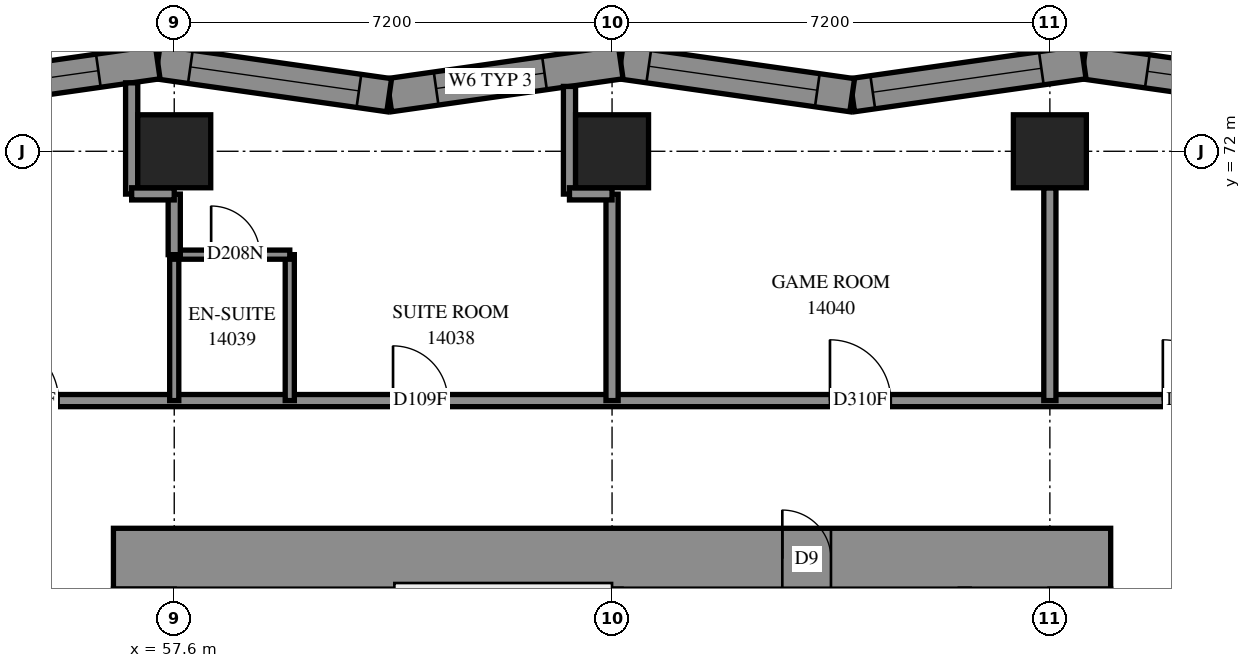
"""IFC4 building model, lengths in metres.
Left out: names, types, materials, properties, quantities, classifications, styles, units other than length and angle.
Written with IfcOpenShell. Run it as: python <this file> out.ifc"""

import sys

from ifc_helpers import new_model, si_unit, direction, frame, frame_2d, origin, origin_2d, place, context, subcontext, project, spatial, polyline, rectangle, outline, extrude, element, fill, save


model = new_model("IFC4")
c1 = context("Model", 3, precision=1e-05, world=origin(), true_north=direction((0.0, 1.0)))
c2 = subcontext(c1, "Body", "Model", "MODEL_VIEW")
j1 = project(units=[si_unit("LENGTHUNIT", "METRE"), si_unit("PLANEANGLEUNIT", "RADIAN")], contexts=[c1])
p1 = place(None, origin())
s1 = spatial("IfcSite", under=j1, at=p1, CompositionType="ELEMENT")
p2 = place(p1, origin())
s2 = spatial("IfcBuilding", under=s1, at=p2, CompositionType="ELEMENT")
p3 = place(p2, frame((0.0, 0.0, 54.2)))
s3 = spatial("IfcBuildingStorey", under=s2, at=p3, CompositionType="ELEMENT", Elevation=54.2)
for number, where, z_axis, x_axis in (
    (1, (57.6, 72.0, 0.0), (0.0, 0.0, 1.0), (1.0, 0.0, 0.0)),
    (2, (64.8, 72.0, 0.0), (0.0, 0.0, 1.0), (1.0, 0.0, 0.0)),
    (3, (72.0, 72.0, 0.0), (0.0, 0.0, 1.0), (1.0, 0.0, 0.0)),
):
    element("IfcColumn", number, at=place(p3, frame(where, z_axis=z_axis, x_axis=x_axis)), inside=s3, PredefinedType="COLUMN", context=c2, shape_type="SweptSolid", body=[
        extrude(rectangle(XDim=1.2, YDim=1.2, at=origin_2d()), origin(), (0.0, 0.0, 1.0), 3.1),
    ])
p4 = place(p3, frame((56.6, 65.3, -0.3), z_axis=(0.0, 0.0, 1.0), x_axis=(1.0, 0.0, 0.0)))
e4 = element("IfcWall", 4, at=p4, inside=s3, PredefinedType="SHEAR", context=c2, shape_type="SweptSolid", body=[
    extrude(rectangle(XDim=16.4, YDim=1.0, at=frame_2d((8.2, 0.0))), origin(), (0.0, 0.0, 1.0), 2.7),
])
p5 = place(p4, frame((11.0, 0.0, 0.3)))
e5 = element("IfcOpeningElement", 5, at=p5, cuts=e4, PredefinedType="OPENING", context=c2, shape_type="SweptSolid", body=[
    extrude(rectangle(XDim=0.8, YDim=2.1, at=frame_2d((0.4, 1.05))), frame((0.0, 0.51, 0.0), z_axis=(0.0, -1.0, 0.0), x_axis=(1.0, 0.0, 0.0)), (0.0, 0.0, 1.0), 1.02),
])
p6 = place(p3, frame((76.384, 72.919, 0.0), z_axis=(0.0, 0.0, 1.0), x_axis=(-0.9900171381, 0.1409470338, 0.0)))
e6 = element("IfcWall", 6, at=p6, inside=s3, PredefinedType="SOLIDWALL", context=c2, shape_type="SweptSolid", body=[
    extrude(outline(polyline([(0.06, -0.275), (3.906, -0.275), (3.828, 0.275), (-0.06, 0.275), (0.06, -0.275)])), origin(), (0.0, 0.0, 1.0), 3.1),
])
p7 = place(p6, frame((1.61, 0.0, 0.5)))
e7 = element("IfcOpeningElement", 7, at=p7, cuts=e6, PredefinedType="OPENING", context=c2, shape_type="SweptSolid", body=[
    extrude(rectangle(XDim=1.2, YDim=2.45, at=frame_2d((0.6, 1.225))), frame((0.0, 0.285, 0.0), z_axis=(0.0, -1.0, 0.0), x_axis=(1.0, 0.0, 0.0)), (0.0, 0.0, 1.0), 0.57),
])
p8 = place(p3, frame((72.556, 73.464, 0.0), z_axis=(0.0, 0.0, 1.0), x_axis=(-0.990016994, -0.1409480459, 0.0)))
e8 = element("IfcWall", 8, at=p8, inside=s3, PredefinedType="SOLIDWALL", context=c2, shape_type="SweptSolid", body=[
    extrude(outline(polyline([(-0.039, -0.275), (3.806, -0.275), (3.885, 0.275), (0.039, 0.275), (-0.039, -0.275)])), origin(), (0.0, 0.0, 1.0), 3.1),
])
p9 = place(p8, frame((0.704, 0.0, 0.5)))
e9 = element("IfcOpeningElement", 9, at=p9, cuts=e8, PredefinedType="OPENING", context=c2, shape_type="SweptSolid", body=[
    extrude(rectangle(XDim=2.8, YDim=2.45, at=frame_2d((1.4, 1.225))), frame((0.0, 0.285, 0.0), z_axis=(0.0, -1.0, 0.0), x_axis=(1.0, 0.0, 0.0)), (0.0, 0.0, 1.0), 0.57),
])
p10 = place(p3, frame((68.749, 72.922, 0.0), z_axis=(0.0, 0.0, 1.0), x_axis=(-0.990016994, 0.1409480459, 0.0)))
e10 = element("IfcWall", 10, at=p10, inside=s3, PredefinedType="SOLIDWALL", context=c2, shape_type="SweptSolid", body=[
    extrude(outline(polyline([(0.039, -0.275), (3.885, -0.275), (3.806, 0.275), (-0.039, 0.275), (0.039, -0.275)])), origin(), (0.0, 0.0, 1.0), 3.1),
])
p11 = place(p10, frame((0.579, 0.0, 0.5)))
e11 = element("IfcOpeningElement", 11, at=p11, cuts=e10, PredefinedType="OPENING", context=c2, shape_type="SweptSolid", body=[
    extrude(rectangle(XDim=2.8, YDim=2.45, at=frame_2d((1.4, 1.225))), frame((0.0, 0.285, 0.0), z_axis=(0.0, -1.0, 0.0), x_axis=(1.0, 0.0, 0.0)), (0.0, 0.0, 1.0), 0.57),
])
p12 = place(p3, frame((64.942, 73.464, 0.0), z_axis=(0.0, 0.0, 1.0), x_axis=(-0.990016994, -0.1409480459, 0.0)))
e12 = element("IfcWall", 12, at=p12, inside=s3, PredefinedType="SOLIDWALL", context=c2, shape_type="SweptSolid", body=[
    extrude(outline(polyline([(-0.039, -0.275), (3.806, -0.275), (3.885, 0.275), (0.039, 0.275), (-0.039, -0.275)])), origin(), (0.0, 0.0, 1.0), 3.1),
])
p13 = place(p12, frame((1.266, 0.0, 0.7)))
e13 = element("IfcOpeningElement", 13, at=p13, cuts=e12, PredefinedType="OPENING", context=c2, shape_type="SweptSolid", body=[
    extrude(rectangle(XDim=1.8, YDim=2.2, at=frame_2d((0.9, 1.1))), frame((0.0, 0.285, 0.0), z_axis=(0.0, -1.0, 0.0), x_axis=(1.0, 0.0, 0.0)), (0.0, 0.0, 1.0), 0.57),
])
p14 = place(p3, frame((61.135, 72.922, 0.0), z_axis=(0.0, 0.0, 1.0), x_axis=(-0.990016994, 0.1409480459, 0.0)))
e14 = element("IfcWall", 14, at=p14, inside=s3, PredefinedType="SOLIDWALL", context=c2, shape_type="SweptSolid", body=[
    extrude(outline(polyline([(0.039, -0.275), (3.885, -0.275), (3.806, 0.275), (-0.039, 0.275), (0.039, -0.275)])), origin(), (0.0, 0.0, 1.0), 3.1),
])
p15 = place(p14, frame((0.503, 0.0, 0.5)))
e15 = element("IfcOpeningElement", 15, at=p15, cuts=e14, PredefinedType="OPENING", context=c2, shape_type="SweptSolid", body=[
    extrude(rectangle(XDim=2.8, YDim=2.45, at=frame_2d((1.4, 1.225))), frame((0.0, 0.285, 0.0), z_axis=(0.0, -1.0, 0.0), x_axis=(1.0, 0.0, 0.0)), (0.0, 0.0, 1.0), 0.57),
])
p16 = place(p3, frame((57.328, 73.464, 0.0), z_axis=(0.0, 0.0, 1.0), x_axis=(-0.990016994, -0.1409480459, 0.0)))
e16 = element("IfcWall", 16, at=p16, inside=s3, PredefinedType="SOLIDWALL", context=c2, shape_type="SweptSolid", body=[
    extrude(outline(polyline([(-0.039, -0.275), (3.806, -0.275), (3.885, 0.275), (0.039, 0.275), (-0.039, -0.275)])), origin(), (0.0, 0.0, 1.0), 3.1),
])
p17 = place(p16, frame((0.986, 0.0, 0.7)))
e17 = element("IfcOpeningElement", 17, at=p17, cuts=e16, PredefinedType="OPENING", context=c2, shape_type="SweptSolid", body=[
    extrude(rectangle(XDim=1.8, YDim=2.2, at=frame_2d((0.9, 1.1))), frame((0.0, 0.285, 0.0), z_axis=(0.0, -1.0, 0.0), x_axis=(1.0, 0.0, 0.0)), (0.0, 0.0, 1.0), 0.57),
])
p18 = place(p3, frame((54.5, 67.9, 0.0), z_axis=(0.0, 0.0, 1.0), x_axis=(1.0, 0.0, 0.0)))
e18 = element("IfcWall", 18, at=p18, inside=s3, PredefinedType="PARTITIONING", context=c2, shape_type="SweptSolid", body=[
    extrude(rectangle(XDim=20.6, YDim=0.2, at=frame_2d((10.3, 0.0))), origin(), (0.0, 0.0, 1.0), 3.1),
])
p19 = place(p18, frame((0.198, 0.0, 0.0)))
e19 = element("IfcOpeningElement", 19, at=p19, cuts=e18, PredefinedType="OPENING", context=c2, shape_type="SweptSolid", body=[
    extrude(rectangle(XDim=1.0, YDim=2.1, at=frame_2d((0.5, 1.05))), frame((0.0, 0.11, 0.0), z_axis=(0.0, -1.0, 0.0), x_axis=(1.0, 0.0, 0.0)), (0.0, 0.0, 1.0), 0.22),
])
p20 = place(p18, frame((19.358, 0.0, 0.0)))
e20 = element("IfcOpeningElement", 20, at=p20, cuts=e18, PredefinedType="OPENING", context=c2, shape_type="SweptSolid", body=[
    extrude(rectangle(XDim=1.0, YDim=2.1, at=frame_2d((0.5, 1.05))), frame((0.0, 0.11, 0.0), z_axis=(0.0, -1.0, 0.0), x_axis=(1.0, 0.0, 0.0)), (0.0, 0.0, 1.0), 0.22),
])
p21 = place(p18, frame((6.698, 0.0, 0.0)))
e21 = element("IfcOpeningElement", 21, at=p21, cuts=e18, PredefinedType="OPENING", context=c2, shape_type="SweptSolid", body=[
    extrude(rectangle(XDim=0.9, YDim=2.1, at=frame_2d((0.45, 1.05))), frame((0.0, 0.11, 0.0), z_axis=(0.0, -1.0, 0.0), x_axis=(1.0, 0.0, 0.0)), (0.0, 0.0, 1.0), 0.22),
])
p22 = place(p18, frame((13.884, 0.0, 0.0)))
e22 = element("IfcOpeningElement", 22, at=p22, cuts=e18, PredefinedType="OPENING", context=c2, shape_type="SweptSolid", body=[
    extrude(rectangle(XDim=1.0, YDim=2.1, at=frame_2d((0.5, 1.05))), frame((0.0, 0.11, 0.0), z_axis=(0.0, -1.0, 0.0), x_axis=(1.0, 0.0, 0.0)), (0.0, 0.0, 1.0), 0.22),
])
p23 = place(p3, frame((72.0, 67.9, 0.0), z_axis=(0.0, 0.0, 1.0), x_axis=(0.0, 1.0, 0.0)))
e23 = element("IfcWall", 23, at=p23, inside=s3, PredefinedType="PARTITIONING", context=c2, shape_type="SweptSolid", body=[
    extrude(rectangle(XDim=3.5, YDim=0.2, at=frame_2d((1.75, 0.0))), origin(), (0.0, 0.0, 1.0), 3.1),
])
p24 = place(p3, frame((64.8, 67.9, 0.0), z_axis=(0.0, 0.0, 1.0), x_axis=(0.0, 1.0, 0.0)))
e24 = element("IfcWall", 24, at=p24, inside=s3, PredefinedType="PARTITIONING", context=c2, shape_type="SweptSolid", body=[
    extrude(rectangle(XDim=3.396, YDim=0.2, at=frame_2d((1.698, 0.0))), origin(), (0.0, 0.0, 1.0), 3.1),
])
for number, where, z_axis, x_axis in (
    (25, (59.5, 67.9, 0.0), (0.0, 0.0, 1.0), (0.0, 1.0, 0.0)),
    (26, (57.6, 67.9, 0.0), (0.0, 0.0, 1.0), (0.0, 1.0, 0.0)),
):
    element("IfcWall", number, at=place(p3, frame(where, z_axis=z_axis, x_axis=x_axis)), inside=s3, PredefinedType="PARTITIONING", context=c2, shape_type="SweptSolid", body=[
        extrude(rectangle(XDim=2.4, YDim=0.15, at=frame_2d((1.2, 0.0))), origin(), (0.0, 0.0, 1.0), 3.1),
    ])
p25 = place(p3, frame((57.6, 70.3, 0.0), z_axis=(0.0, 0.0, 1.0), x_axis=(1.0, 0.0, 0.0)))
e27 = element("IfcWall", 27, at=p25, inside=s3, PredefinedType="PARTITIONING", context=c2, shape_type="SweptSolid", body=[
    extrude(rectangle(XDim=1.9, YDim=0.15, at=frame_2d((0.95, 0.0))), origin(), (0.0, 0.0, 1.0), 3.1),
])
p26 = place(p25, frame((0.607, 0.0, 0.0)))
e28 = element("IfcOpeningElement", 28, at=p26, cuts=e27, PredefinedType="OPENING", context=c2, shape_type="SweptSolid", body=[
    extrude(rectangle(XDim=0.8, YDim=2.1, at=frame_2d((0.4, 1.05))), frame((0.0, 0.085, 0.0), z_axis=(0.0, -1.0, 0.0), x_axis=(1.0, 0.0, 0.0)), (0.0, 0.0, 1.0), 0.17),
])
p27 = place(p3, frame((56.9, 71.296, 0.0), z_axis=(0.0, 0.0, 1.0), x_axis=(0.0, 1.0, 0.0)))
e29 = element("IfcWall", 29, at=p27, inside=s3, PredefinedType="PARTITIONING", context=c2, shape_type="SweptSolid", body=[
    extrude(rectangle(XDim=1.829, YDim=0.2, at=frame_2d((0.915, 0.0))), origin(), (0.0, 0.0, 1.0), 3.1),
])
p28 = place(p3, frame((64.1, 71.296, 0.0), z_axis=(0.0, 0.0, 1.0), x_axis=(0.0, 1.0, 0.0)))
e30 = element("IfcWall", 30, at=p28, inside=s3, PredefinedType="PARTITIONING", context=c2, shape_type="SweptSolid", body=[
    extrude(rectangle(XDim=1.771, YDim=0.2, at=frame_2d((0.885, 0.0))), origin(), (0.0, 0.0, 1.0), 3.1),
])
p29 = place(p3, frame((57.6, 70.3, 0.0), z_axis=(0.0, 0.0, 1.0), x_axis=(0.0, 1.0, 0.0)))
e31 = element("IfcWall", 31, at=p29, inside=s3, PredefinedType="PARTITIONING", context=c2, shape_type="SweptSolid", body=[
    extrude(rectangle(XDim=0.996, YDim=0.2, at=frame_2d((0.498, 0.0))), origin(), (0.0, 0.0, 1.0), 3.1),
])
for number, where, z_axis, x_axis in (
    (32, (56.9, 71.3, 0.0), (0.0, 0.0, 1.0), (1.0, 0.0, 0.0)),
    (33, (64.1, 71.3, 0.0), (0.0, 0.0, 1.0), (1.0, 0.0, 0.0)),
):
    element("IfcWall", number, at=place(p3, frame(where, z_axis=z_axis, x_axis=x_axis)), inside=s3, PredefinedType="PARTITIONING", context=c2, shape_type="SweptSolid", body=[
        extrude(rectangle(XDim=0.7, YDim=0.2, at=frame_2d((0.35, 0.0))), origin(), (0.0, 0.0, 1.0), 3.1),
    ])
p30 = place(p7, origin())
e34 = element("IfcWindow", 34, at=p30, inside=s3, PartitioningType="SINGLE_PANEL", PredefinedType="WINDOW", context=c2, shape_type="SweptSolid", body=[
    extrude(rectangle(XDim=1.2, YDim=2.45, at=frame_2d((0.6, 1.225))), frame((0.0, 0.155, 0.0), z_axis=(0.0, -1.0, 0.0), x_axis=(1.0, 0.0, 0.0)), (0.0, 0.0, 1.0), 0.06),
])
fill(e7, e34)
p31 = place(p9, origin())
e35 = element("IfcWindow", 35, at=p31, inside=s3, PartitioningType="SINGLE_PANEL", PredefinedType="WINDOW", context=c2, shape_type="SweptSolid", body=[
    extrude(rectangle(XDim=2.8, YDim=2.45, at=frame_2d((1.4, 1.225))), frame((0.0, 0.155, 0.0), z_axis=(0.0, -1.0, 0.0), x_axis=(1.0, 0.0, 0.0)), (0.0, 0.0, 1.0), 0.06),
])
fill(e9, e35)
p32 = place(p11, origin())
e36 = element("IfcWindow", 36, at=p32, inside=s3, PartitioningType="SINGLE_PANEL", PredefinedType="WINDOW", context=c2, shape_type="SweptSolid", body=[
    extrude(rectangle(XDim=2.8, YDim=2.45, at=frame_2d((1.4, 1.225))), frame((0.0, 0.155, 0.0), z_axis=(0.0, -1.0, 0.0), x_axis=(1.0, 0.0, 0.0)), (0.0, 0.0, 1.0), 0.06),
])
fill(e11, e36)
p33 = place(p15, origin())
e37 = element("IfcWindow", 37, at=p33, inside=s3, PartitioningType="SINGLE_PANEL", PredefinedType="WINDOW", context=c2, shape_type="SweptSolid", body=[
    extrude(rectangle(XDim=2.8, YDim=2.45, at=frame_2d((1.4, 1.225))), frame((0.0, 0.155, 0.0), z_axis=(0.0, -1.0, 0.0), x_axis=(1.0, 0.0, 0.0)), (0.0, 0.0, 1.0), 0.06),
])
fill(e15, e37)
p34 = place(p5, origin())
e38 = element("IfcDoor", 38, at=p34, inside=s3, OperationType="SINGLE_SWING_RIGHT", PredefinedType="DOOR", context=c2, shape_type="SweptSolid", body=[
    extrude(rectangle(XDim=0.8, YDim=2.1, at=frame_2d((0.4, 1.05))), frame((0.0, -0.44, 0.0), z_axis=(0.0, -1.0, 0.0), x_axis=(1.0, 0.0, 0.0)), (0.0, 0.0, 1.0), 0.05),
])
fill(e5, e38)
p35 = place(p19, origin())
e39 = element("IfcDoor", 39, at=p35, inside=s3, OperationType="SINGLE_SWING_LEFT", PredefinedType="DOOR", context=c2, shape_type="SweptSolid", body=[
    extrude(rectangle(XDim=1.0, YDim=2.1, at=frame_2d((0.5, 1.05))), frame((0.0, 0.025, 0.0), z_axis=(0.0, -1.0, 0.0), x_axis=(1.0, 0.0, 0.0)), (0.0, 0.0, 1.0), 0.05),
])
fill(e19, e39)
p36 = place(p20, origin())
e40 = element("IfcDoor", 40, at=p36, inside=s3, OperationType="SINGLE_SWING_RIGHT", PredefinedType="DOOR", context=c2, shape_type="SweptSolid", body=[
    extrude(rectangle(XDim=1.0, YDim=2.1, at=frame_2d((0.5, 1.05))), frame((0.0, 0.025, 0.0), z_axis=(0.0, -1.0, 0.0), x_axis=(1.0, 0.0, 0.0)), (0.0, 0.0, 1.0), 0.05),
])
fill(e20, e40)
p37 = place(p21, origin())
e41 = element("IfcDoor", 41, at=p37, inside=s3, OperationType="SINGLE_SWING_RIGHT", PredefinedType="DOOR", context=c2, shape_type="SweptSolid", body=[
    extrude(rectangle(XDim=0.9, YDim=2.1, at=frame_2d((0.45, 1.05))), frame((0.0, 0.025, 0.0), z_axis=(0.0, -1.0, 0.0), x_axis=(1.0, 0.0, 0.0)), (0.0, 0.0, 1.0), 0.05),
])
fill(e21, e41)
p38 = place(p26, origin())
e42 = element("IfcDoor", 42, at=p38, inside=s3, OperationType="SINGLE_SWING_RIGHT", PredefinedType="DOOR", context=c2, shape_type="SweptSolid", body=[
    extrude(rectangle(XDim=0.8, YDim=2.1, at=frame_2d((0.4, 1.05))), frame((0.0, 0.025, 0.0), z_axis=(0.0, -1.0, 0.0), x_axis=(1.0, 0.0, 0.0)), (0.0, 0.0, 1.0), 0.05),
])
fill(e28, e42)
p39 = place(p22, origin())
e43 = element("IfcDoor", 43, at=p39, inside=s3, OperationType="SINGLE_SWING_RIGHT", PredefinedType="DOOR", context=c2, shape_type="SweptSolid", body=[
    extrude(rectangle(XDim=1.0, YDim=2.1, at=frame_2d((0.5, 1.05))), frame((0.0, 0.025, 0.0), z_axis=(0.0, -1.0, 0.0), x_axis=(1.0, 0.0, 0.0)), (0.0, 0.0, 1.0), 0.05),
])
fill(e22, e43)
p40 = place(p13, origin())
e44 = element("IfcWindow", 44, at=p40, inside=s3, PartitioningType="SINGLE_PANEL", PredefinedType="WINDOW", context=c2, shape_type="SweptSolid", body=[
    extrude(rectangle(XDim=1.8, YDim=2.2, at=frame_2d((0.9, 1.1))), frame((0.0, 0.155, 0.0), z_axis=(0.0, -1.0, 0.0), x_axis=(1.0, 0.0, 0.0)), (0.0, 0.0, 1.0), 0.06),
])
fill(e13, e44)
p41 = place(p17, origin())
e45 = element("IfcWindow", 45, at=p41, inside=s3, PartitioningType="SINGLE_PANEL", PredefinedType="WINDOW", context=c2, shape_type="SweptSolid", body=[
    extrude(rectangle(XDim=1.8, YDim=2.2, at=frame_2d((0.9, 1.1))), frame((0.0, 0.155, 0.0), z_axis=(0.0, -1.0, 0.0), x_axis=(1.0, 0.0, 0.0)), (0.0, 0.0, 1.0), 0.06),
])
fill(e17, e45)
save(model, sys.argv[1])
